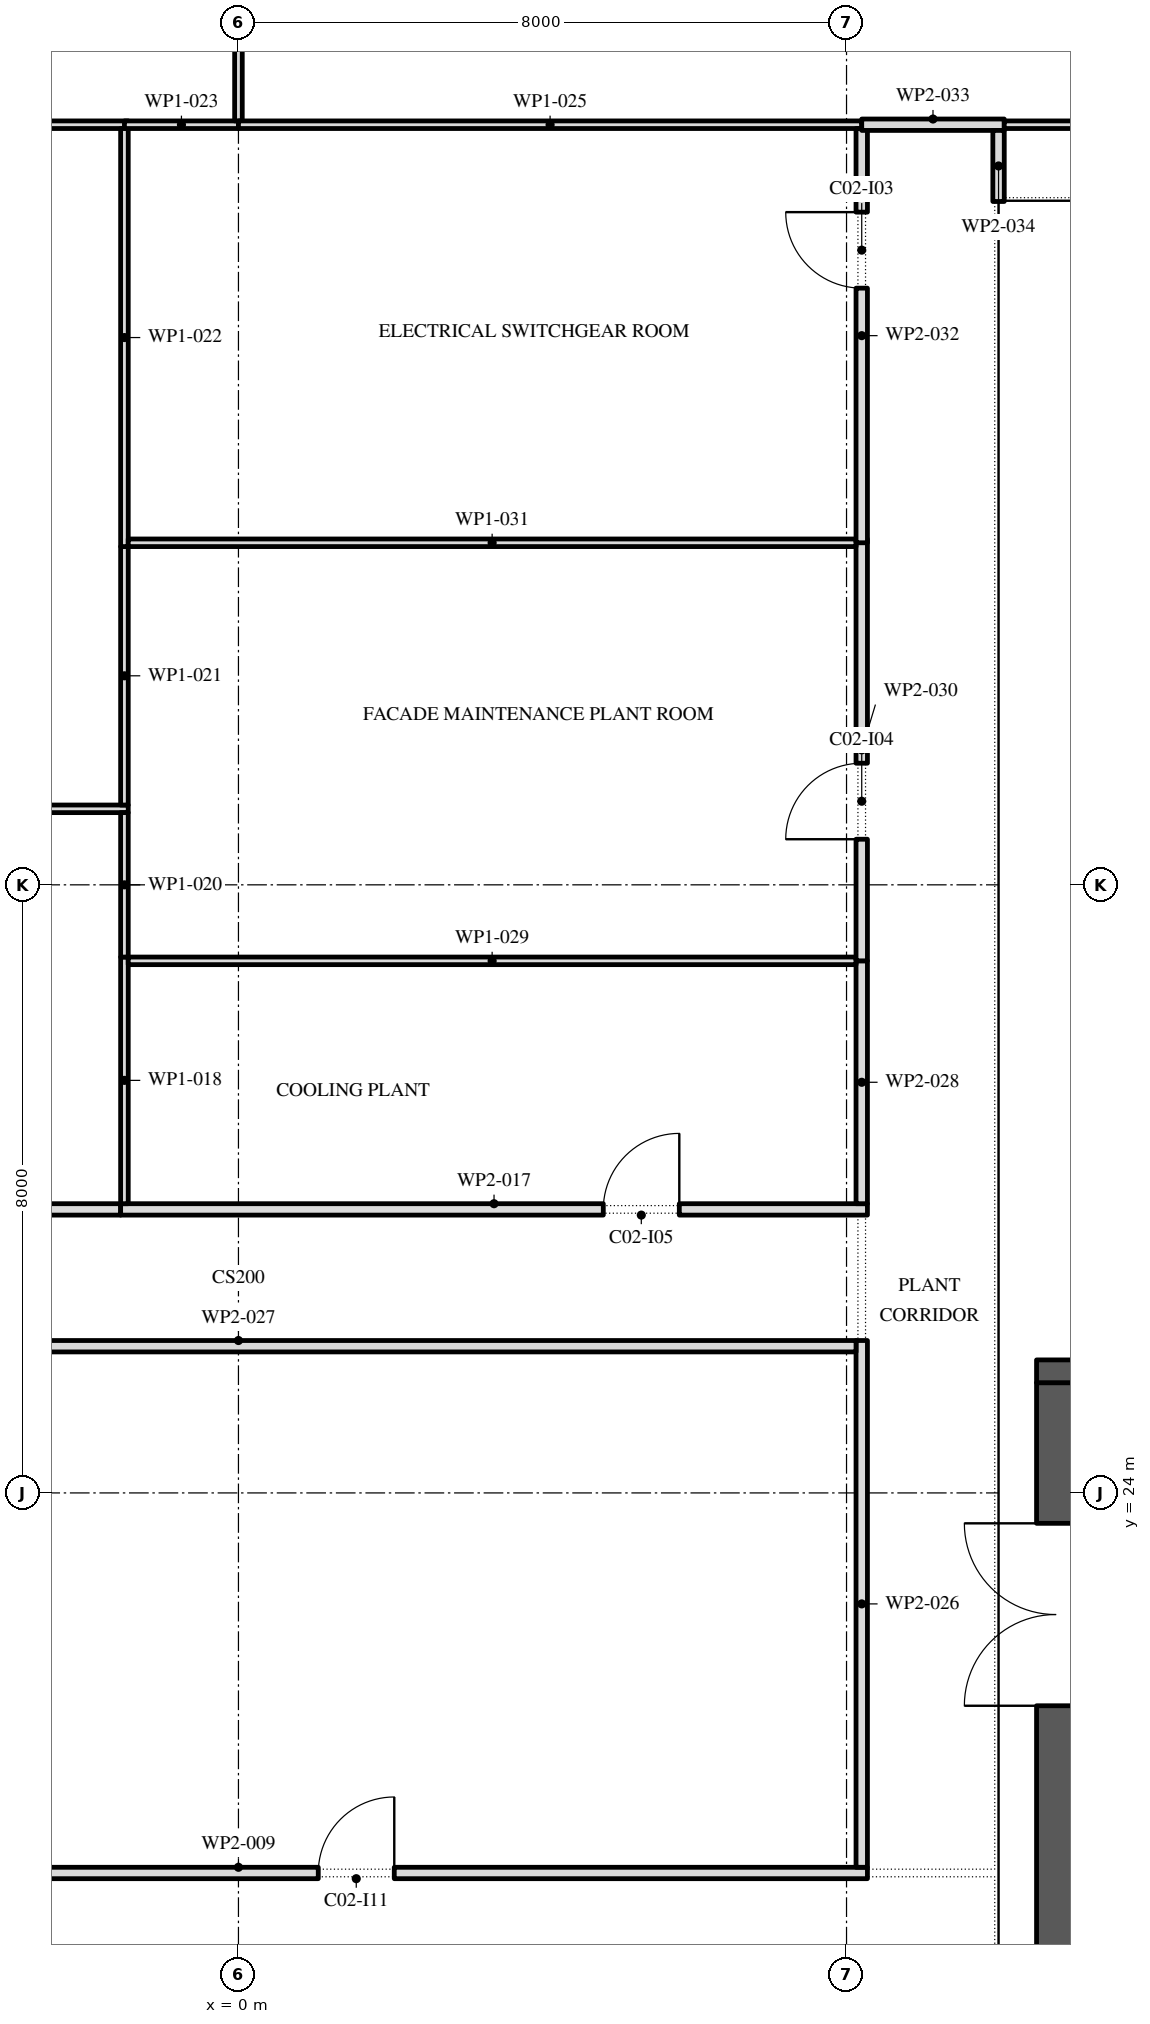
"""IFC4 building model, lengths in metres.
Left out: names, types, materials, properties, quantities, classifications, styles, units other than length and angle.
Written with IfcOpenShell. Run it as: python <this file> out.ifc"""

import sys

from ifc_helpers import new_model, si_unit, direction, frame, frame_2d, origin, place, context, subcontext, project, spatial, rectangle, extrude, element, fill, save


model = new_model("IFC4")
c1 = context("Model", 3, precision=1e-05, world=origin(), true_north=direction((0.0, 1.0)))
c2 = subcontext(c1, "Body", "Model", "MODEL_VIEW")
j1 = project(units=[si_unit("LENGTHUNIT", "METRE"), si_unit("PLANEANGLEUNIT", "RADIAN")], contexts=[c1])
p1 = place(None, origin())
s1 = spatial("IfcSite", under=j1, at=p1, CompositionType="ELEMENT")
p2 = place(p1, origin())
s2 = spatial("IfcBuilding", under=s1, at=p2, CompositionType="ELEMENT")
p3 = place(p2, frame((0.0, 0.0, 373.2)))
s3 = spatial("IfcBuildingStorey", under=s2, at=p3, CompositionType="ELEMENT", Elevation=373.2)
p4 = place(p3, frame((10.75, -2.45, 0.0), z_axis=(0.0, 0.0, 1.0), x_axis=(0.0, 1.0, 0.0)))
e1 = element("IfcWall", 1, at=p4, inside=s3, PredefinedType="SHEAR", context=c2, shape_type="SweptSolid", body=[
    extrude(rectangle(XDim=27.9, YDim=0.5, at=frame_2d((13.95, 0.0))), origin(), (0.0, 0.0, 1.0), 4.0),
])
p5 = place(p4, frame((23.65, 0.0, 0.0)))
e2 = element("IfcOpeningElement", 2, at=p5, cuts=e1, PredefinedType="OPENING", context=c2, shape_type="SweptSolid", body=[
    extrude(rectangle(XDim=2.4, YDim=2.1, at=frame_2d((1.2, 1.05))), frame((0.0, 0.26, 0.0), z_axis=(0.0, -1.0, 0.0), x_axis=(1.0, 0.0, 0.0)), (0.0, 0.0, 1.0), 0.52),
])
p6 = place(p4, frame((1.087, 0.0, 0.0)))
e3 = element("IfcOpeningElement", 3, at=p6, cuts=e1, PredefinedType="OPENING", context=c2, shape_type="SweptSolid", body=[
    extrude(rectangle(XDim=0.9, YDim=2.1, at=frame_2d((0.45, 1.05))), frame((0.0, 0.26, 0.0), z_axis=(0.0, -1.0, 0.0), x_axis=(1.0, 0.0, 0.0)), (0.0, 0.0, 1.0), 0.52),
])
p7 = place(p4, frame((4.262, 0.0, 0.0)))
e4 = element("IfcOpeningElement", 4, at=p7, cuts=e1, PredefinedType="OPENING", context=c2, shape_type="SweptSolid", body=[
    extrude(rectangle(XDim=1.0, YDim=2.1, at=frame_2d((0.5, 1.05))), frame((0.0, 0.26, 0.0), z_axis=(0.0, -1.0, 0.0), x_axis=(1.0, 0.0, 0.0)), (0.0, 0.0, 1.0), 0.52),
])
p8 = place(p3, frame((10.5, 25.6, 0.0), z_axis=(0.0, 0.0, 1.0), x_axis=(1.0, 0.0, 0.0)))
e5 = element("IfcWall", 5, at=p8, inside=s3, PredefinedType="SHEAR", context=c2, shape_type="SweptSolid", body=[
    extrude(rectangle(XDim=11.0, YDim=0.3, at=frame_2d((5.5, 0.0))), origin(), (0.0, 0.0, 1.0), 4.0),
])
p9 = place(p3, frame((-8.275, 19.0, 0.0), z_axis=(0.0, 0.0, 1.0), x_axis=(1.0, 0.0, 0.0)))
e6 = element("IfcWall", 6, at=p9, inside=s3, PredefinedType="PARTITIONING", context=c2, shape_type="SweptSolid", body=[
    extrude(rectangle(XDim=16.55, YDim=0.15, at=frame_2d((8.275, 0.0))), origin(), (0.0, 0.0, 1.0), 4.0),
])
p10 = place(p9, frame((9.325, 0.0, 0.0)))
e7 = element("IfcOpeningElement", 7, at=p10, cuts=e6, PredefinedType="OPENING", context=c2, shape_type="SweptSolid", body=[
    extrude(rectangle(XDim=1.0, YDim=2.1, at=frame_2d((0.5, 1.05))), frame((0.0, 0.085, 0.0), z_axis=(0.0, -1.0, 0.0), x_axis=(1.0, 0.0, 0.0)), (0.0, 0.0, 1.0), 0.17),
])
p11 = place(p3, frame((-8.275, 27.73, 0.0), z_axis=(0.0, 0.0, 1.0), x_axis=(1.0, 0.0, 0.0)))
e8 = element("IfcWall", 8, at=p11, inside=s3, PredefinedType="PARTITIONING", context=c2, shape_type="SweptSolid", body=[
    extrude(rectangle(XDim=6.725, YDim=0.15, at=frame_2d((3.362, 0.0))), origin(), (0.0, 0.0, 1.0), 4.0),
])
p12 = place(p11, frame((3.625, 0.0, 0.0)))
e9 = element("IfcOpeningElement", 9, at=p12, cuts=e8, PredefinedType="OPENING", context=c2, shape_type="SweptSolid", body=[
    extrude(rectangle(XDim=1.0, YDim=2.1, at=frame_2d((0.5, 1.05))), frame((0.0, 0.085, 0.0), z_axis=(0.0, -1.0, 0.0), x_axis=(1.0, 0.0, 0.0)), (0.0, 0.0, 1.0), 0.17),
])
p13 = place(p3, frame((-7.55, 42.0, 0.0), z_axis=(0.0, 0.0, 1.0), x_axis=(1.0, 0.0, 0.0)))
e10 = element("IfcWall", 10, at=p13, inside=s3, PredefinedType="PARTITIONING", context=c2, shape_type="SweptSolid", body=[
    extrude(rectangle(XDim=6.1, YDim=0.1, at=frame_2d((3.05, 0.0))), origin(), (0.0, 0.0, 1.0), 4.0),
])
p14 = place(p13, frame((3.2, 0.0, 0.0)))
e11 = element("IfcOpeningElement", 11, at=p14, cuts=e10, PredefinedType="OPENING", context=c2, shape_type="SweptSolid", body=[
    extrude(rectangle(XDim=0.9, YDim=2.1, at=frame_2d((0.45, 1.05))), frame((0.0, 0.06, 0.0), z_axis=(0.0, -1.0, 0.0), x_axis=(1.0, 0.0, 0.0)), (0.0, 0.0, 1.0), 0.12),
])
p15 = place(p3, frame((-1.55, 27.73, 0.0), z_axis=(0.0, 0.0, 1.0), x_axis=(1.0, 0.0, 0.0)))
e12 = element("IfcWall", 12, at=p15, inside=s3, PredefinedType="PARTITIONING", context=c2, shape_type="SweptSolid", body=[
    extrude(rectangle(XDim=9.825, YDim=0.15, at=frame_2d((4.913, 0.0))), origin(), (0.0, 0.0, 1.0), 4.0),
])
p16 = place(p15, frame((6.35, 0.0, 0.0)))
e13 = element("IfcOpeningElement", 13, at=p16, cuts=e12, PredefinedType="OPENING", context=c2, shape_type="SweptSolid", body=[
    extrude(rectangle(XDim=1.0, YDim=2.1, at=frame_2d((0.5, 1.05))), frame((0.0, 0.085, 0.0), z_axis=(0.0, -1.0, 0.0), x_axis=(1.0, 0.0, 0.0)), (0.0, 0.0, 1.0), 0.17),
])
p17 = place(p3, frame((-1.5, 31.05, 0.0), z_axis=(0.0, 0.0, 1.0), x_axis=(0.0, -1.0, 0.0)))
e14 = element("IfcWall", 14, at=p17, inside=s3, PredefinedType="PARTITIONING", context=c2, shape_type="SweptSolid", body=[
    extrude(rectangle(XDim=3.245, YDim=0.1, at=frame_2d((1.623, 0.0))), origin(), (0.0, 0.0, 1.0), 4.0),
])
p18 = place(p3, frame((-1.45, 33.0, 0.0), z_axis=(0.0, 0.0, 1.0), x_axis=(-1.0, 0.0, 0.0)))
e15 = element("IfcWall", 15, at=p18, inside=s3, PredefinedType="PARTITIONING", context=c2, shape_type="SweptSolid", body=[
    extrude(rectangle(XDim=6.675, YDim=0.1, at=frame_2d((3.337, 0.0))), origin(), (0.0, 0.0, 1.0), 4.0),
])
p19 = place(p3, frame((-1.5, 32.95, 0.0), z_axis=(0.0, 0.0, 1.0), x_axis=(0.0, -1.0, 0.0)))
e16 = element("IfcWall", 16, at=p19, inside=s3, PredefinedType="PARTITIONING", context=c2, shape_type="SweptSolid", body=[
    extrude(rectangle(XDim=1.9, YDim=0.1, at=frame_2d((0.95, 0.0))), origin(), (0.0, 0.0, 1.0), 4.0),
])
p20 = place(p3, frame((-1.5, 36.45, 0.0), z_axis=(0.0, 0.0, 1.0), x_axis=(0.0, -1.0, 0.0)))
e17 = element("IfcWall", 17, at=p20, inside=s3, PredefinedType="PARTITIONING", context=c2, shape_type="SweptSolid", body=[
    extrude(rectangle(XDim=3.4, YDim=0.1, at=frame_2d((1.7, 0.0))), origin(), (0.0, 0.0, 1.0), 4.0),
])
p21 = place(p3, frame((-1.5, 41.95, 0.0), z_axis=(0.0, 0.0, 1.0), x_axis=(0.0, -1.0, 0.0)))
e18 = element("IfcWall", 18, at=p21, inside=s3, PredefinedType="PARTITIONING", context=c2, shape_type="SweptSolid", body=[
    extrude(rectangle(XDim=5.5, YDim=0.1, at=frame_2d((2.75, 0.0))), origin(), (0.0, 0.0, 1.0), 4.0),
])
p22 = place(p3, frame((-1.5, 42.0, 0.0), z_axis=(0.0, 0.0, 1.0), x_axis=(1.0, 0.0, 0.0)))
e19 = element("IfcWall", 19, at=p22, inside=s3, PredefinedType="PARTITIONING", context=c2, shape_type="SweptSolid", body=[
    extrude(rectangle(XDim=1.5, YDim=0.1, at=frame_2d((0.75, 0.0))), origin(), (0.0, 0.0, 1.0), 4.0),
])
p23 = place(p3, frame((0.0, 42.05, 0.0), z_axis=(0.0, 0.0, 1.0), x_axis=(0.0, 1.0, 0.0)))
e20 = element("IfcWall", 20, at=p23, inside=s3, PredefinedType="PARTITIONING", context=c2, shape_type="SweptSolid", body=[
    extrude(rectangle(XDim=8.378, YDim=0.1, at=frame_2d((4.189, 0.0))), origin(), (0.0, 0.0, 1.0), 4.0),
])
p24 = place(p3, frame((0.0, 42.0, 0.0), z_axis=(0.0, 0.0, 1.0), x_axis=(1.0, 0.0, 0.0)))
e21 = element("IfcWall", 21, at=p24, inside=s3, PredefinedType="PARTITIONING", context=c2, shape_type="SweptSolid", body=[
    extrude(rectangle(XDim=8.2, YDim=0.1, at=frame_2d((4.1, 0.0))), origin(), (0.0, 0.0, 1.0), 4.0),
])
p25 = place(p3, frame((8.2, 19.075, 0.0), z_axis=(0.0, 0.0, 1.0), x_axis=(0.0, 1.0, 0.0)))
e22 = element("IfcWall", 22, at=p25, inside=s3, PredefinedType="PARTITIONING", context=c2, shape_type="SweptSolid", body=[
    extrude(rectangle(XDim=6.93, YDim=0.15, at=frame_2d((3.465, 0.0))), origin(), (0.0, 0.0, 1.0), 4.0),
])
p26 = place(p3, frame((8.125, 25.93, 0.0), z_axis=(0.0, 0.0, 1.0), x_axis=(-1.0, 0.0, 0.0)))
e23 = element("IfcWall", 23, at=p26, inside=s3, PredefinedType="PARTITIONING", context=c2, shape_type="SweptSolid", body=[
    extrude(rectangle(XDim=16.25, YDim=0.15, at=frame_2d((8.125, 0.0))), origin(), (0.0, 0.0, 1.0), 4.0),
])
p27 = place(p3, frame((8.2, 27.805, 0.0), z_axis=(0.0, 0.0, 1.0), x_axis=(0.0, 1.0, 0.0)))
e24 = element("IfcWall", 24, at=p27, inside=s3, PredefinedType="PARTITIONING", context=c2, shape_type="SweptSolid", body=[
    extrude(rectangle(XDim=3.195, YDim=0.15, at=frame_2d((1.598, 0.0))), origin(), (0.0, 0.0, 1.0), 4.0),
])
p28 = place(p3, frame((8.125, 31.0, 0.0), z_axis=(0.0, 0.0, 1.0), x_axis=(-1.0, 0.0, 0.0)))
e25 = element("IfcWall", 25, at=p28, inside=s3, PredefinedType="PARTITIONING", context=c2, shape_type="SweptSolid", body=[
    extrude(rectangle(XDim=9.575, YDim=0.1, at=frame_2d((4.788, 0.0))), origin(), (0.0, 0.0, 1.0), 4.0),
])
p29 = place(p3, frame((8.2, 31.0, 0.0), z_axis=(0.0, 0.0, 1.0), x_axis=(0.0, 1.0, 0.0)))
e26 = element("IfcWall", 26, at=p29, inside=s3, PredefinedType="PARTITIONING", context=c2, shape_type="SweptSolid", body=[
    extrude(rectangle(XDim=5.55, YDim=0.15, at=frame_2d((2.775, 0.0))), origin(), (0.0, 0.0, 1.0), 4.0),
])
p30 = place(p29, frame((1.6, 0.0, 0.0)))
e27 = element("IfcOpeningElement", 27, at=p30, cuts=e26, PredefinedType="OPENING", context=c2, shape_type="SweptSolid", body=[
    extrude(rectangle(XDim=1.0, YDim=2.1, at=frame_2d((0.5, 1.05))), frame((0.0, 0.085, 0.0), z_axis=(0.0, -1.0, 0.0), x_axis=(1.0, 0.0, 0.0)), (0.0, 0.0, 1.0), 0.17),
])
p31 = place(p3, frame((8.125, 36.5, 0.0), z_axis=(0.0, 0.0, 1.0), x_axis=(-1.0, 0.0, 0.0)))
e28 = element("IfcWall", 28, at=p31, inside=s3, PredefinedType="PARTITIONING", context=c2, shape_type="SweptSolid", body=[
    extrude(rectangle(XDim=9.575, YDim=0.1, at=frame_2d((4.788, 0.0))), origin(), (0.0, 0.0, 1.0), 4.0),
])
p32 = place(p3, frame((8.2, 36.5, 0.0), z_axis=(0.0, 0.0, 1.0), x_axis=(0.0, 1.0, 0.0)))
e29 = element("IfcWall", 29, at=p32, inside=s3, PredefinedType="PARTITIONING", context=c2, shape_type="SweptSolid", body=[
    extrude(rectangle(XDim=5.45, YDim=0.15, at=frame_2d((2.725, 0.0))), origin(), (0.0, 0.0, 1.0), 4.0),
])
p33 = place(p32, frame((3.35, 0.0, 0.0)))
e30 = element("IfcOpeningElement", 30, at=p33, cuts=e29, PredefinedType="OPENING", context=c2, shape_type="SweptSolid", body=[
    extrude(rectangle(XDim=1.0, YDim=2.1, at=frame_2d((0.5, 1.05))), frame((0.0, 0.085, 0.0), z_axis=(0.0, -1.0, 0.0), x_axis=(1.0, 0.0, 0.0)), (0.0, 0.0, 1.0), 0.17),
])
p34 = place(p3, frame((8.2, 42.0, 0.0), z_axis=(0.0, 0.0, 1.0), x_axis=(1.0, 0.0, 0.0)))
e31 = element("IfcWall", 31, at=p34, inside=s3, PredefinedType="PARTITIONING", context=c2, shape_type="SweptSolid", body=[
    extrude(rectangle(XDim=1.875, YDim=0.15, at=frame_2d((0.938, 0.0))), origin(), (0.0, 0.0, 1.0), 4.0),
])
p35 = place(p3, frame((10.0, 41.925, 0.0), z_axis=(0.0, 0.0, 1.0), x_axis=(0.0, -1.0, 0.0)))
e32 = element("IfcWall", 32, at=p35, inside=s3, PredefinedType="PARTITIONING", context=c2, shape_type="SweptSolid", body=[
    extrude(rectangle(XDim=0.935, YDim=0.15, at=frame_2d((0.468, 0.0))), origin(), (0.0, 0.0, 1.0), 4.0),
])
p36 = place(p3, frame((10.075, 42.0, 0.0), z_axis=(0.0, 0.0, 1.0), x_axis=(1.0, 0.0, 0.0)))
e33 = element("IfcWall", 33, at=p36, inside=s3, PredefinedType="PARTITIONING", context=c2, shape_type="SweptSolid", body=[
    extrude(rectangle(XDim=5.075, YDim=0.1, at=frame_2d((2.538, 0.0))), origin(), (0.0, 0.0, 1.0), 4.0),
])
p37 = place(p5, origin())
e34 = element("IfcDoor", 34, at=p37, inside=s3, OperationType="DOUBLE_DOOR_SINGLE_SWING", PredefinedType="DOOR", context=c2, shape_type="SweptSolid", body=[
    extrude(rectangle(XDim=2.4, YDim=2.1, at=frame_2d((1.2, 1.05))), frame((0.0, 0.025, 0.0), z_axis=(0.0, -1.0, 0.0), x_axis=(1.0, 0.0, 0.0)), (0.0, 0.0, 1.0), 0.05),
])
fill(e2, e34)
p38 = place(p33, origin())
e35 = element("IfcDoor", 35, at=p38, inside=s3, OperationType="SINGLE_SWING_LEFT", PredefinedType="DOOR", context=c2, shape_type="SweptSolid", body=[
    extrude(rectangle(XDim=1.0, YDim=2.1, at=frame_2d((0.5, 1.05))), frame((0.0, 0.025, 0.0), z_axis=(0.0, -1.0, 0.0), x_axis=(1.0, 0.0, 0.0)), (0.0, 0.0, 1.0), 0.05),
])
fill(e30, e35)
p39 = place(p30, origin())
e36 = element("IfcDoor", 36, at=p39, inside=s3, OperationType="SINGLE_SWING_RIGHT", PredefinedType="DOOR", context=c2, shape_type="SweptSolid", body=[
    extrude(rectangle(XDim=1.0, YDim=2.1, at=frame_2d((0.5, 1.05))), frame((0.0, 0.025, 0.0), z_axis=(0.0, -1.0, 0.0), x_axis=(1.0, 0.0, 0.0)), (0.0, 0.0, 1.0), 0.05),
])
fill(e27, e36)
p40 = place(p16, origin())
e37 = element("IfcDoor", 37, at=p40, inside=s3, OperationType="SINGLE_SWING_LEFT", PredefinedType="DOOR", context=c2, shape_type="SweptSolid", body=[
    extrude(rectangle(XDim=1.0, YDim=2.1, at=frame_2d((0.5, 1.05))), frame((0.0, 0.025, 0.0), z_axis=(0.0, -1.0, 0.0), x_axis=(1.0, 0.0, 0.0)), (0.0, 0.0, 1.0), 0.05),
])
fill(e13, e37)
p41 = place(p10, origin())
e38 = element("IfcDoor", 38, at=p41, inside=s3, OperationType="SINGLE_SWING_LEFT", PredefinedType="DOOR", context=c2, shape_type="SweptSolid", body=[
    extrude(rectangle(XDim=1.0, YDim=2.1, at=frame_2d((0.5, 1.05))), frame((0.0, 0.025, 0.0), z_axis=(0.0, -1.0, 0.0), x_axis=(1.0, 0.0, 0.0)), (0.0, 0.0, 1.0), 0.05),
])
fill(e7, e38)
save(model, sys.argv[1])
